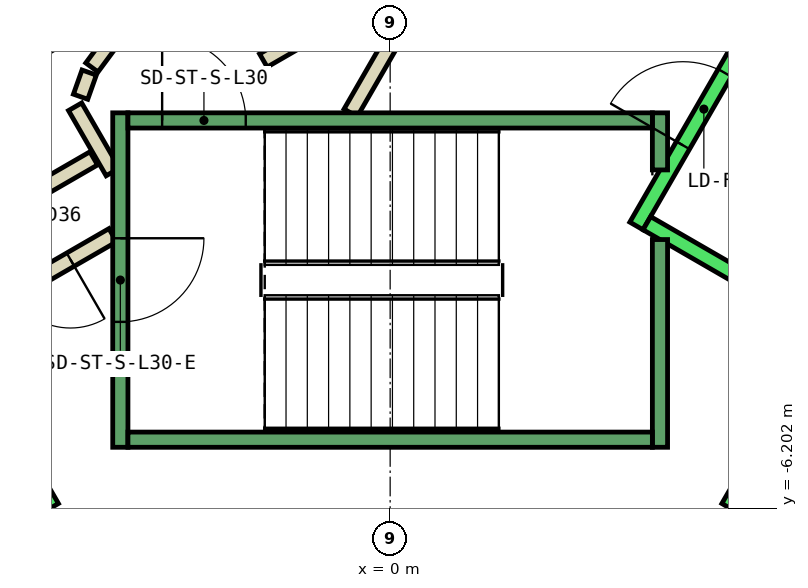
"""IFC4 building model, lengths in metres.
Left out: names, types, materials, properties, quantities, classifications, styles, units other than length and angle.
Written with IfcOpenShell. Run it as: python <this file> out.ifc"""

import sys

from ifc_helpers import new_model, si_unit, direction, frame, frame_2d, origin, place, context, subcontext, project, spatial, rectangle, extrude, element, fill, save


model = new_model("IFC4")
c1 = context("Model", 3, precision=1e-05, world=origin(), true_north=direction((0.0, 1.0)))
c2 = subcontext(c1, "Body", "Model", "MODEL_VIEW")
j1 = project(units=[si_unit("LENGTHUNIT", "METRE"), si_unit("PLANEANGLEUNIT", "RADIAN")], contexts=[c1])
p1 = place(None, origin())
s1 = spatial("IfcSite", under=j1, at=p1, CompositionType="ELEMENT")
p2 = place(p1, origin())
s2 = spatial("IfcBuilding", under=s1, at=p2, CompositionType="ELEMENT")
p3 = place(p2, frame((0.0, 0.0, 138.2)))
s3 = spatial("IfcBuildingStorey", under=s2, at=p3, CompositionType="ELEMENT", Elevation=138.2)
p4 = place(p3, frame((-3.9, -1.599, 0.0), z_axis=(0.0, 0.0, 1.0), x_axis=(-0.865969445389, -0.500096910261, 0.0)))
e1 = element("IfcWall", 1, at=p4, inside=s3, PredefinedType="PARTITIONING", context=c2, shape_type="SweptSolid", body=[
    extrude(rectangle(XDim=1.373, YDim=0.2, at=frame_2d((0.687, 0.0))), origin(), (0.0, 0.0, 1.0), 3.8),
])
p5 = place(p3, frame((-3.65, -2.61, 0.0), z_axis=(0.0, 0.0, 1.0), x_axis=(-0.866072462134, -0.499918483688, 0.0)))
e2 = element("IfcWall", 2, at=p5, inside=s3, PredefinedType="PARTITIONING", context=c2, shape_type="SweptSolid", body=[
    extrude(rectangle(XDim=2.084, YDim=0.2, at=frame_2d((1.042, 0.0))), origin(), (0.0, 0.0, 1.0), 3.8),
])
p6 = place(p5, frame((0.642, 0.0, 0.0)))
e3 = element("IfcOpeningElement", 3, at=p6, cuts=e2, PredefinedType="OPENING", context=c2, shape_type="SweptSolid", body=[
    extrude(rectangle(XDim=0.9, YDim=2.1, at=frame_2d((0.45, 1.05))), frame((0.0, 0.11, 0.0), z_axis=(0.0, -1.0, 0.0), x_axis=(1.0, 0.0, 0.0)), (0.0, 0.0, 1.0), 0.22),
])
p7 = place(p3, frame((-4.145, -0.92, 0.0), z_axis=(0.0, 0.0, 1.0), x_axis=(0.499743786207, -0.866173278362, 0.0)))
e4 = element("IfcWall", 4, at=p7, inside=s3, PredefinedType="PARTITIONING", context=c2, shape_type="SweptSolid", body=[
    extrude(rectangle(XDim=0.991, YDim=0.2, at=frame_2d((0.495, 0.0))), origin(), (0.0, 0.0, 1.0), 3.8),
])
p8 = place(p3, frame((-0.52, -1.0, 0.0), z_axis=(0.0, 0.0, 1.0), x_axis=(0.50011622646, 0.865958290007, 0.0)))
e5 = element("IfcWall", 5, at=p8, inside=s3, PredefinedType="PARTITIONING", context=c2, shape_type="SweptSolid", body=[
    extrude(rectangle(XDim=4.991, YDim=0.2, at=frame_2d((2.496, 0.0))), origin(), (0.0, 0.0, 1.0), 3.8),
])
p9 = place(p8, frame((1.945, 0.0, 0.0)))
e6 = element("IfcOpeningElement", 6, at=p9, cuts=e5, PredefinedType="OPENING", context=c2, shape_type="SweptSolid", body=[
    extrude(rectangle(XDim=1.0, YDim=2.1, at=frame_2d((0.5, 1.05))), frame((0.0, 0.11, 0.0), z_axis=(0.0, -1.0, 0.0), x_axis=(1.0, 0.0, 0.0)), (0.0, 0.0, 1.0), 0.22),
])
p10 = place(p3, frame((-0.412, 0.414, 0.0), z_axis=(0.0, 0.0, 1.0), x_axis=(-0.866017369001, -0.500013916395, 0.0)))
e7 = element("IfcWall", 7, at=p10, inside=s3, PredefinedType="PARTITIONING", context=c2, shape_type="SweptSolid", body=[
    extrude(rectangle(XDim=1.45, YDim=0.2, at=frame_2d((0.725, 0.0))), origin(), (0.0, 0.0, 1.0), 3.8),
])
p11 = place(p3, frame((-3.723, -0.131, 0.0), z_axis=(0.0, 0.0, 1.0), x_axis=(-0.594675113454, -0.803966112121, 0.0)))
e8 = element("IfcWall", 8, at=p11, inside=s3, PredefinedType="PARTITIONING", context=c2, shape_type="SweptSolid", body=[
    extrude(rectangle(XDim=0.338, YDim=0.2, at=frame_2d((0.169, 0.0))), origin(), (0.0, 0.0, 1.0), 3.8),
])
p12 = place(p3, frame((-3.96, -0.47, 0.0), z_axis=(0.0, 0.0, 1.0), x_axis=(-0.334824194261, -0.942280615813, 0.0)))
e9 = element("IfcWall", 9, at=p12, inside=s3, PredefinedType="PARTITIONING", context=c2, shape_type="SweptSolid", body=[
    extrude(rectangle(XDim=0.338, YDim=0.2, at=frame_2d((0.169, 0.0))), origin(), (0.0, 0.0, 1.0), 3.8),
])
p13 = place(p3, frame((-9.751, 2.99, 0.0), z_axis=(0.0, 0.0, 1.0), x_axis=(0.50000090737, -0.866024879913, 0.0)))
e10 = element("IfcWall", 10, at=p13, inside=s3, PredefinedType="STANDARD", context=c2, shape_type="SweptSolid", body=[
    extrude(rectangle(XDim=10.6, YDim=0.2, at=frame_2d((5.3, 0.0))), origin(), (0.0, 0.0, 1.0), 3.8),
])
p14 = place(p3, frame((3.24, -2.488, 0.0), z_axis=(0.0, 0.0, 1.0), x_axis=(0.49994636267, 0.866056369097, 0.0)))
e11 = element("IfcWall", 11, at=p14, inside=s3, PredefinedType="STANDARD", context=c2, shape_type="SweptSolid", body=[
    extrude(rectangle(XDim=2.8, YDim=0.2, at=frame_2d((1.4, 0.0))), origin(), (0.0, 0.0, 1.0), 3.8),
])
p15 = place(p14, frame((1.225, 0.0, 0.0)))
e12 = element("IfcOpeningElement", 12, at=p15, cuts=e11, PredefinedType="OPENING", context=c2, shape_type="SweptSolid", body=[
    extrude(rectangle(XDim=1.1, YDim=2.1, at=frame_2d((0.55, 1.05))), frame((0.0, 0.11, 0.0), z_axis=(0.0, -1.0, 0.0), x_axis=(1.0, 0.0, 0.0)), (0.0, 0.0, 1.0), 0.22),
])
p16 = place(p3, frame((3.377, -2.452, 0.0), z_axis=(0.0, 0.0, 1.0), x_axis=(0.865955154139, -0.50012165622, 0.0)))
e13 = element("IfcWall", 13, at=p16, inside=s3, PredefinedType="STANDARD", context=c2, shape_type="SweptSolid", body=[
    extrude(rectangle(XDim=2.4, YDim=0.2, at=frame_2d((1.2, 0.0))), origin(), (0.0, 0.0, 1.0), 3.8),
])
p17 = place(p3, frame((4.451, -6.19, 0.0), z_axis=(0.0, 0.0, 1.0), x_axis=(0.50000090737, 0.866024879913, 0.0)))
e14 = element("IfcWall", 14, at=p17, inside=s3, PredefinedType="STANDARD", context=c2, shape_type="SweptSolid", body=[
    extrude(rectangle(XDim=10.6, YDim=0.2, at=frame_2d((5.3, 0.0))), origin(), (0.0, 0.0, 1.0), 3.8),
])
p18 = place(p3, frame((-3.55, -1.0, 0.0), z_axis=(0.0, 0.0, 1.0), x_axis=(0.0, -1.0, 0.0)))
e15 = element("IfcWall", 15, at=p18, inside=s3, PredefinedType="STANDARD", context=c2, shape_type="SweptSolid", body=[
    extrude(rectangle(XDim=4.4, YDim=0.2, at=frame_2d((2.2, 0.0))), origin(), (0.0, 0.0, 1.0), 3.8),
])
p19 = place(p18, frame((1.65, 0.0, 0.0)))
e16 = element("IfcOpeningElement", 16, at=p19, cuts=e15, PredefinedType="OPENING", context=c2, shape_type="SweptSolid", body=[
    extrude(rectangle(XDim=1.1, YDim=2.2, at=frame_2d((0.55, 1.1))), frame((0.0, 0.11, 0.0), z_axis=(0.0, -1.0, 0.0), x_axis=(1.0, 0.0, 0.0)), (0.0, 0.0, 1.0), 0.22),
])
p20 = place(p3, frame((3.55, -2.667, 0.0), z_axis=(0.0, 0.0, 1.0), x_axis=(0.0, -1.0, 0.0)))
e17 = element("IfcWall", 17, at=p20, inside=s3, PredefinedType="STANDARD", context=c2, shape_type="SweptSolid", body=[
    extrude(rectangle(XDim=2.733, YDim=0.2, at=frame_2d((1.366, 0.0))), origin(), (0.0, 0.0, 1.0), 3.8),
])
p21 = place(p3, frame((3.55, -1.0, 0.0), z_axis=(0.0, 0.0, 1.0), x_axis=(0.0, -1.0, 0.0)))
e18 = element("IfcWall", 18, at=p21, inside=s3, PredefinedType="STANDARD", context=c2, shape_type="SweptSolid", body=[
    extrude(rectangle(XDim=0.751, YDim=0.2, at=frame_2d((0.375, 0.0))), origin(), (0.0, 0.0, 1.0), 3.8),
])
p22 = place(p3, frame((-3.45, -1.1, 0.0), z_axis=(0.0, 0.0, 1.0), x_axis=(1.0, 0.0, 0.0)))
e19 = element("IfcWall", 19, at=p22, inside=s3, PredefinedType="STANDARD", context=c2, shape_type="SweptSolid", body=[
    extrude(rectangle(XDim=6.9, YDim=0.2, at=frame_2d((3.45, 0.0))), origin(), (0.0, 0.0, 1.0), 3.8),
])
p23 = place(p22, frame((0.45, 0.0, 0.0)))
e20 = element("IfcOpeningElement", 20, at=p23, cuts=e19, PredefinedType="OPENING", context=c2, shape_type="SweptSolid", body=[
    extrude(rectangle(XDim=1.1, YDim=2.2, at=frame_2d((0.55, 1.1))), frame((0.0, 0.11, 0.0), z_axis=(0.0, -1.0, 0.0), x_axis=(1.0, 0.0, 0.0)), (0.0, 0.0, 1.0), 0.22),
])
p24 = place(p3, frame((-3.45, -5.3, 0.0), z_axis=(0.0, 0.0, 1.0), x_axis=(1.0, 0.0, 0.0)))
e21 = element("IfcWall", 21, at=p24, inside=s3, PredefinedType="STANDARD", context=c2, shape_type="SweptSolid", body=[
    extrude(rectangle(XDim=6.9, YDim=0.2, at=frame_2d((3.45, 0.0))), origin(), (0.0, 0.0, 1.0), 3.8),
])
p25 = place(p6, origin())
e22 = element("IfcDoor", 22, at=p25, inside=s3, OperationType="SINGLE_SWING_LEFT", PredefinedType="DOOR", context=c2, shape_type="SweptSolid", body=[
    extrude(rectangle(XDim=0.9, YDim=2.1, at=frame_2d((0.45, 1.05))), frame((0.0, 0.025, 0.0), z_axis=(0.0, -1.0, 0.0), x_axis=(1.0, 0.0, 0.0)), (0.0, 0.0, 1.0), 0.05),
])
fill(e3, e22)
p26 = place(p15, origin())
e23 = element("IfcDoor", 23, at=p26, inside=s3, OperationType="SLIDING_TO_LEFT", PredefinedType="DOOR", context=c2, shape_type="SweptSolid", body=[
    extrude(rectangle(XDim=1.1, YDim=2.1, at=frame_2d((0.55, 1.05))), frame((0.0, 0.025, 0.0), z_axis=(0.0, -1.0, 0.0), x_axis=(1.0, 0.0, 0.0)), (0.0, 0.0, 1.0), 0.05),
])
fill(e12, e23)
p27 = place(p23, origin())
e24 = element("IfcDoor", 24, at=p27, inside=s3, OperationType="SINGLE_SWING_LEFT", PredefinedType="DOOR", context=c2, shape_type="SweptSolid", body=[
    extrude(rectangle(XDim=1.1, YDim=2.2, at=frame_2d((0.55, 1.1))), frame((0.0, 0.025, 0.0), z_axis=(0.0, -1.0, 0.0), x_axis=(1.0, 0.0, 0.0)), (0.0, 0.0, 1.0), 0.05),
])
fill(e20, e24)
p28 = place(p19, origin())
e25 = element("IfcDoor", 25, at=p28, inside=s3, OperationType="SINGLE_SWING_LEFT", PredefinedType="DOOR", context=c2, shape_type="SweptSolid", body=[
    extrude(rectangle(XDim=1.1, YDim=2.2, at=frame_2d((0.55, 1.1))), frame((0.0, 0.025, 0.0), z_axis=(0.0, -1.0, 0.0), x_axis=(1.0, 0.0, 0.0)), (0.0, 0.0, 1.0), 0.05),
])
fill(e16, e25)
save(model, sys.argv[1])
